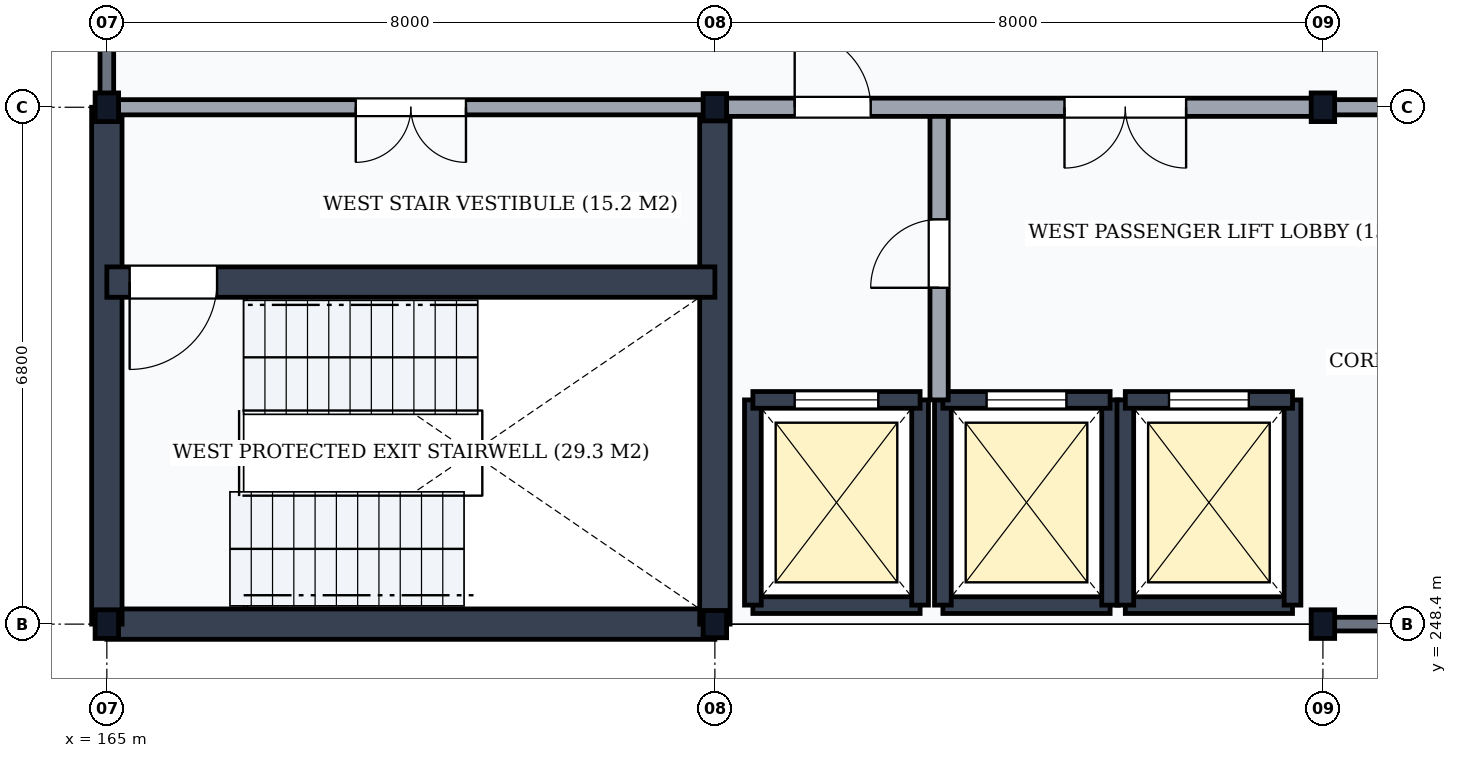
"""IFC4 building model, lengths in metres.
Left out: names, types, materials, properties, quantities, classifications, styles, units other than length and angle.
Written with IfcOpenShell. Run it as: python <this file> out.ifc"""

import sys

from ifc_helpers import new_model, si_unit, direction, frame, frame_2d, origin, origin_2d, place, context, subcontext, project, spatial, rectangle, i_section, extrude, element, fill, save


model = new_model("IFC4")
c1 = context("Model", 3, precision=1e-05, world=origin(), true_north=direction((0.0, 1.0)))
c2 = subcontext(c1, "Body", "Model", "MODEL_VIEW")
j1 = project(units=[si_unit("LENGTHUNIT", "METRE"), si_unit("PLANEANGLEUNIT", "RADIAN")], contexts=[c1])
p1 = place(None, origin())
s1 = spatial("IfcSite", under=j1, at=p1, CompositionType="ELEMENT")
p2 = place(p1, origin())
s2 = spatial("IfcBuilding", under=s1, at=p2, CompositionType="ELEMENT")
p3 = place(p2, frame((0.0, 0.0, 39.9)))
s3 = spatial("IfcBuildingStorey", under=s2, at=p3, CompositionType="ELEMENT", Elevation=39.9)
for number, where, z_axis, x_axis in (
    (1, (165.0, 248.4, 0.0), (0.0, 0.0, 1.0), (1.0, 0.0, 0.0)),
    (2, (165.0, 255.2, 0.0), (0.0, 0.0, 1.0), (1.0, 0.0, 0.0)),
):
    element("IfcColumn", number, at=place(p3, frame(where, z_axis=z_axis, x_axis=x_axis)), inside=s3, PredefinedType="COLUMN", context=c2, shape_type="SweptSolid", body=[
        extrude(i_section(OverallWidth=0.309, OverallDepth=0.377, WebThickness=0.021, FlangeThickness=0.04, FilletRadius=0.027, at=origin_2d()), origin(), (0.0, 0.0, 1.0), 3.9),
    ])
for number, where, z_axis, x_axis in (
    (3, (173.0, 248.4, 0.0), (0.0, 0.0, 1.0), (1.0, 0.0, 0.0)),
    (4, (173.0, 255.2, 0.0), (0.0, 0.0, 1.0), (1.0, 0.0, 0.0)),
):
    element("IfcColumn", number, at=place(p3, frame(where, z_axis=z_axis, x_axis=x_axis)), inside=s3, PredefinedType="COLUMN", context=c2, shape_type="SweptSolid", body=[
        extrude(i_section(OverallWidth=0.309, OverallDepth=0.359, WebThickness=0.021, FlangeThickness=0.04, FilletRadius=0.027, at=origin_2d()), origin(), (0.0, 0.0, 1.0), 3.9),
    ])
for number, where, z_axis, x_axis in (
    (5, (181.0, 248.4, 0.0), (0.0, 0.0, 1.0), (1.0, 0.0, 0.0)),
    (6, (181.0, 255.2, 0.0), (0.0, 0.0, 1.0), (1.0, 0.0, 0.0)),
):
    element("IfcColumn", number, at=place(p3, frame(where, z_axis=z_axis, x_axis=x_axis)), inside=s3, PredefinedType="COLUMN", context=c2, shape_type="SweptSolid", body=[
        extrude(i_section(OverallWidth=0.309, OverallDepth=0.377, WebThickness=0.021, FlangeThickness=0.04, FilletRadius=0.027, at=origin_2d()), origin(), (0.0, 0.0, 1.0), 3.9),
    ])
p4 = place(p3, frame((181.006, 248.4, 0.0), z_axis=(0.0, 0.0, 1.0), x_axis=(1.0, 0.0, 0.0)))
e7 = element("IfcWall", 7, at=p4, inside=s3, PredefinedType="SOLIDWALL", context=c2, shape_type="SweptSolid", body=[
    extrude(rectangle(XDim=7.988, YDim=0.18, at=frame_2d((3.994, 0.0))), origin(), (0.0, 0.0, 1.0), 3.368),
])
p5 = place(p4, frame((3.319, 0.0, 0.85)))
e8 = element("IfcOpeningElement", 8, at=p5, cuts=e7, PredefinedType="OPENING", context=c2, shape_type="SweptSolid", body=[
    extrude(rectangle(XDim=0.75, YDim=2.0, at=frame_2d((0.375, 1.0))), frame((0.0, 0.105, 0.0), z_axis=(0.0, -1.0, 0.0), x_axis=(1.0, 0.0, 0.0)), (0.0, 0.0, 1.0), 0.21),
])
p6 = place(p3, frame((165.0, 255.206, 0.0), z_axis=(0.0, 0.0, 1.0), x_axis=(0.0, 1.0, 0.0)))
e9 = element("IfcWall", 9, at=p6, inside=s3, PredefinedType="SOLIDWALL", context=c2, shape_type="SweptSolid", body=[
    extrude(rectangle(XDim=7.588, YDim=0.18, at=frame_2d((3.794, 0.0))), origin(), (0.0, 0.0, 1.0), 3.408),
])
p7 = place(p3, frame((165.0, 248.4, 0.0), z_axis=(0.0, 0.0, 1.0), x_axis=(1.0, 0.0, 0.0)))
e10 = element("IfcWall", 10, at=p7, inside=s3, PredefinedType="SHEAR", context=c2, shape_type="SweptSolid", body=[
    extrude(rectangle(XDim=8.0, YDim=0.4, at=frame_2d((4.0, 0.0))), origin(), (0.0, 0.0, 1.0), 3.68),
])
for number, where, z_axis, x_axis in (
    (11, (165.0, 248.4, 0.0), (0.0, 0.0, 1.0), (0.0, 1.0, 0.0)),
    (12, (173.0, 248.4, 0.0), (0.0, 0.0, 1.0), (0.0, 1.0, 0.0)),
):
    element("IfcWall", number, at=place(p3, frame(where, z_axis=z_axis, x_axis=x_axis)), inside=s3, PredefinedType="SHEAR", context=c2, shape_type="SweptSolid", body=[
        extrude(rectangle(XDim=6.8, YDim=0.4, at=frame_2d((3.4, 0.0))), origin(), (0.0, 0.0, 1.0), 3.68),
    ])
p8 = place(p3, frame((165.0, 252.9, 0.0), z_axis=(0.0, 0.0, 1.0), x_axis=(1.0, 0.0, 0.0)))
e13 = element("IfcWall", 13, at=p8, inside=s3, PredefinedType="SHEAR", context=c2, shape_type="SweptSolid", body=[
    extrude(rectangle(XDim=8.0, YDim=0.4, at=frame_2d((4.0, 0.0))), origin(), (0.0, 0.0, 1.0), 3.68),
])
p9 = place(p8, frame((0.3, 0.0, 0.0)))
e14 = element("IfcOpeningElement", 14, at=p9, cuts=e13, PredefinedType="OPENING", context=c2, shape_type="SweptSolid", body=[
    extrude(rectangle(XDim=1.15, YDim=2.15, at=frame_2d((0.575, 1.075))), frame((0.0, 0.215, 0.0), z_axis=(0.0, -1.0, 0.0), x_axis=(1.0, 0.0, 0.0)), (0.0, 0.0, 1.0), 0.43),
])
p10 = place(p3, frame((165.0, 255.2, 0.0), z_axis=(0.0, 0.0, 1.0), x_axis=(1.0, 0.0, 0.0)))
e15 = element("IfcWall", 15, at=p10, inside=s3, PredefinedType="PARTITIONING", context=c2, shape_type="SweptSolid", body=[
    extrude(rectangle(XDim=8.0, YDim=0.2, at=frame_2d((4.0, 0.0))), origin(), (0.0, 0.0, 1.0), 3.178),
])
p11 = place(p10, frame((3.275, 0.0, 0.0)))
e16 = element("IfcOpeningElement", 16, at=p11, cuts=e15, PredefinedType="OPENING", context=c2, shape_type="SweptSolid", body=[
    extrude(rectangle(XDim=1.45, YDim=2.2, at=frame_2d((0.725, 1.1))), frame((0.0, 0.115, 0.0), z_axis=(0.0, -1.0, 0.0), x_axis=(1.0, 0.0, 0.0)), (0.0, 0.0, 1.0), 0.23),
])
p12 = place(p3, frame((173.5, 248.65, 0.0), z_axis=(0.0, 0.0, 1.0), x_axis=(1.0, 0.0, 0.0)))
e17 = element("IfcWall", 17, at=p12, inside=s3, PredefinedType="SHEAR", context=c2, shape_type="SweptSolid", body=[
    extrude(rectangle(XDim=2.2, YDim=0.22, at=frame_2d((1.1, 0.0))), origin(), (0.0, 0.0, 1.0), 3.68),
])
for number, where, z_axis, x_axis in (
    (18, (173.5, 248.65, 0.0), (0.0, 0.0, 1.0), (0.0, 1.0, 0.0)),
    (19, (175.7, 248.65, 0.0), (0.0, 0.0, 1.0), (0.0, 1.0, 0.0)),
):
    element("IfcWall", number, at=place(p3, frame(where, z_axis=z_axis, x_axis=x_axis)), inside=s3, PredefinedType="SHEAR", context=c2, shape_type="SweptSolid", body=[
        extrude(rectangle(XDim=2.7, YDim=0.22, at=frame_2d((1.35, 0.0))), origin(), (0.0, 0.0, 1.0), 3.68),
    ])
p13 = place(p3, frame((173.5, 251.35, 0.0), z_axis=(0.0, 0.0, 1.0), x_axis=(1.0, 0.0, 0.0)))
e20 = element("IfcWall", 20, at=p13, inside=s3, PredefinedType="SHEAR", context=c2, shape_type="SweptSolid", body=[
    extrude(rectangle(XDim=2.2, YDim=0.22, at=frame_2d((1.1, 0.0))), origin(), (0.0, 0.0, 1.0), 3.68),
])
p14 = place(p13, frame((0.55, 0.0, 0.0)))
e21 = element("IfcOpeningElement", 21, at=p14, cuts=e20, PredefinedType="OPENING", context=c2, shape_type="SweptSolid", body=[
    extrude(rectangle(XDim=1.1, YDim=2.15, at=frame_2d((0.55, 1.075))), frame((0.0, 0.125, 0.0), z_axis=(0.0, -1.0, 0.0), x_axis=(1.0, 0.0, 0.0)), (0.0, 0.0, 1.0), 0.25),
])
p15 = place(p3, frame((176.0, 248.65, 0.0), z_axis=(0.0, 0.0, 1.0), x_axis=(1.0, 0.0, 0.0)))
e22 = element("IfcWall", 22, at=p15, inside=s3, PredefinedType="SHEAR", context=c2, shape_type="SweptSolid", body=[
    extrude(rectangle(XDim=2.2, YDim=0.22, at=frame_2d((1.1, 0.0))), origin(), (0.0, 0.0, 1.0), 3.68),
])
for number, where, z_axis, x_axis in (
    (23, (176.0, 248.65, 0.0), (0.0, 0.0, 1.0), (0.0, 1.0, 0.0)),
    (24, (178.2, 248.65, 0.0), (0.0, 0.0, 1.0), (0.0, 1.0, 0.0)),
):
    element("IfcWall", number, at=place(p3, frame(where, z_axis=z_axis, x_axis=x_axis)), inside=s3, PredefinedType="SHEAR", context=c2, shape_type="SweptSolid", body=[
        extrude(rectangle(XDim=2.7, YDim=0.22, at=frame_2d((1.35, 0.0))), origin(), (0.0, 0.0, 1.0), 3.68),
    ])
p16 = place(p3, frame((176.0, 251.35, 0.0), z_axis=(0.0, 0.0, 1.0), x_axis=(1.0, 0.0, 0.0)))
e25 = element("IfcWall", 25, at=p16, inside=s3, PredefinedType="SHEAR", context=c2, shape_type="SweptSolid", body=[
    extrude(rectangle(XDim=2.2, YDim=0.22, at=frame_2d((1.1, 0.0))), origin(), (0.0, 0.0, 1.0), 3.68),
])
p17 = place(p16, frame((0.575, 0.0, 0.0)))
e26 = element("IfcOpeningElement", 26, at=p17, cuts=e25, PredefinedType="OPENING", context=c2, shape_type="SweptSolid", body=[
    extrude(rectangle(XDim=1.05, YDim=2.15, at=frame_2d((0.525, 1.075))), frame((0.0, 0.125, 0.0), z_axis=(0.0, -1.0, 0.0), x_axis=(1.0, 0.0, 0.0)), (0.0, 0.0, 1.0), 0.25),
])
p18 = place(p3, frame((178.4, 248.65, 0.0), z_axis=(0.0, 0.0, 1.0), x_axis=(1.0, 0.0, 0.0)))
e27 = element("IfcWall", 27, at=p18, inside=s3, PredefinedType="SHEAR", context=c2, shape_type="SweptSolid", body=[
    extrude(rectangle(XDim=2.2, YDim=0.22, at=frame_2d((1.1, 0.0))), origin(), (0.0, 0.0, 1.0), 3.68),
])
for number, where, z_axis, x_axis in (
    (28, (178.4, 248.65, 0.0), (0.0, 0.0, 1.0), (0.0, 1.0, 0.0)),
    (29, (180.6, 248.65, 0.0), (0.0, 0.0, 1.0), (0.0, 1.0, 0.0)),
):
    element("IfcWall", number, at=place(p3, frame(where, z_axis=z_axis, x_axis=x_axis)), inside=s3, PredefinedType="SHEAR", context=c2, shape_type="SweptSolid", body=[
        extrude(rectangle(XDim=2.7, YDim=0.22, at=frame_2d((1.35, 0.0))), origin(), (0.0, 0.0, 1.0), 3.68),
    ])
p19 = place(p3, frame((178.4, 251.35, 0.0), z_axis=(0.0, 0.0, 1.0), x_axis=(1.0, 0.0, 0.0)))
e30 = element("IfcWall", 30, at=p19, inside=s3, PredefinedType="SHEAR", context=c2, shape_type="SweptSolid", body=[
    extrude(rectangle(XDim=2.2, YDim=0.22, at=frame_2d((1.1, 0.0))), origin(), (0.0, 0.0, 1.0), 3.68),
])
p20 = place(p19, frame((0.575, 0.0, 0.0)))
e31 = element("IfcOpeningElement", 31, at=p20, cuts=e30, PredefinedType="OPENING", context=c2, shape_type="SweptSolid", body=[
    extrude(rectangle(XDim=1.05, YDim=2.15, at=frame_2d((0.525, 1.075))), frame((0.0, 0.125, 0.0), z_axis=(0.0, -1.0, 0.0), x_axis=(1.0, 0.0, 0.0)), (0.0, 0.0, 1.0), 0.25),
])
p21 = place(p3, frame((175.95, 251.35, 0.0), z_axis=(0.0, 0.0, 1.0), x_axis=(0.0, 1.0, 0.0)))
e32 = element("IfcWall", 32, at=p21, inside=s3, PredefinedType="PARTITIONING", context=c2, shape_type="SweptSolid", body=[
    extrude(rectangle(XDim=3.85, YDim=0.24, at=frame_2d((1.925, 0.0))), origin(), (0.0, 0.0, 1.0), 3.68),
])
p22 = place(p21, frame((1.475, 0.0, 0.0)))
e33 = element("IfcOpeningElement", 33, at=p22, cuts=e32, PredefinedType="OPENING", context=c2, shape_type="SweptSolid", body=[
    extrude(rectangle(XDim=0.9, YDim=2.1, at=frame_2d((0.45, 1.05))), frame((0.0, 0.135, 0.0), z_axis=(0.0, -1.0, 0.0), x_axis=(1.0, 0.0, 0.0)), (0.0, 0.0, 1.0), 0.27),
])
p23 = place(p3, frame((173.0, 255.2, 0.0), z_axis=(0.0, 0.0, 1.0), x_axis=(1.0, 0.0, 0.0)))
e34 = element("IfcWall", 34, at=p23, inside=s3, PredefinedType="PARTITIONING", context=c2, shape_type="SweptSolid", body=[
    extrude(rectangle(XDim=8.0, YDim=0.24, at=frame_2d((4.0, 0.0))), origin(), (0.0, 0.0, 1.0), 3.178),
])
p24 = place(p23, frame((1.05, 0.0, 0.0)))
e35 = element("IfcOpeningElement", 35, at=p24, cuts=e34, PredefinedType="OPENING", context=c2, shape_type="SweptSolid", body=[
    extrude(rectangle(XDim=1.0, YDim=2.1, at=frame_2d((0.5, 1.05))), frame((0.0, 0.135, 0.0), z_axis=(0.0, -1.0, 0.0), x_axis=(1.0, 0.0, 0.0)), (0.0, 0.0, 1.0), 0.27),
])
p25 = place(p23, frame((4.6, 0.0, 0.0)))
e36 = element("IfcOpeningElement", 36, at=p25, cuts=e34, PredefinedType="OPENING", context=c2, shape_type="SweptSolid", body=[
    extrude(rectangle(XDim=1.6, YDim=2.25, at=frame_2d((0.8, 1.125))), frame((0.0, 0.135, 0.0), z_axis=(0.0, -1.0, 0.0), x_axis=(1.0, 0.0, 0.0)), (0.0, 0.0, 1.0), 0.27),
])
p26 = place(p3, frame((181.0, 255.2, 0.0), z_axis=(0.0, 0.0, 1.0), x_axis=(1.0, 0.0, 0.0)))
e37 = element("IfcWall", 37, at=p26, inside=s3, PredefinedType="PARTITIONING", context=c2, shape_type="SweptSolid", body=[
    extrude(rectangle(XDim=8.0, YDim=0.2, at=frame_2d((4.0, 0.0))), origin(), (0.0, 0.0, 1.0), 3.178),
])
p27 = place(p26, frame((0.85, 0.0, 0.0)))
e38 = element("IfcOpeningElement", 38, at=p27, cuts=e37, PredefinedType="OPENING", context=c2, shape_type="SweptSolid", body=[
    extrude(rectangle(XDim=0.9, YDim=2.1, at=frame_2d((0.45, 1.05))), frame((0.0, 0.115, 0.0), z_axis=(0.0, -1.0, 0.0), x_axis=(1.0, 0.0, 0.0)), (0.0, 0.0, 1.0), 0.23),
])
p28 = place(p26, frame((3.25, 0.0, 0.0)))
e39 = element("IfcOpeningElement", 39, at=p28, cuts=e37, PredefinedType="OPENING", context=c2, shape_type="SweptSolid", body=[
    extrude(rectangle(XDim=0.9, YDim=2.1, at=frame_2d((0.45, 1.05))), frame((0.0, 0.115, 0.0), z_axis=(0.0, -1.0, 0.0), x_axis=(1.0, 0.0, 0.0)), (0.0, 0.0, 1.0), 0.23),
])
p29 = place(p26, frame((5.075, 0.0, 0.0)))
e40 = element("IfcOpeningElement", 40, at=p29, cuts=e37, PredefinedType="OPENING", context=c2, shape_type="SweptSolid", body=[
    extrude(rectangle(XDim=0.95, YDim=2.1, at=frame_2d((0.475, 1.05))), frame((0.0, 0.115, 0.0), z_axis=(0.0, -1.0, 0.0), x_axis=(1.0, 0.0, 0.0)), (0.0, 0.0, 1.0), 0.23),
])
p30 = place(p26, frame((6.5, 0.0, 0.0)))
e41 = element("IfcOpeningElement", 41, at=p30, cuts=e37, PredefinedType="OPENING", context=c2, shape_type="SweptSolid", body=[
    extrude(rectangle(XDim=0.85, YDim=2.1, at=frame_2d((0.425, 1.05))), frame((0.0, 0.115, 0.0), z_axis=(0.0, -1.0, 0.0), x_axis=(1.0, 0.0, 0.0)), (0.0, 0.0, 1.0), 0.23),
])
p31 = place(p9, frame((1.15, 0.0, 0.0), z_axis=(0.0, 0.0, 1.0), x_axis=(-1.0, 0.0, 0.0)))
e42 = element("IfcDoor", 42, at=p31, inside=s3, OperationType="SINGLE_SWING_RIGHT", PredefinedType="DOOR", context=c2, shape_type="SweptSolid", body=[
    extrude(rectangle(XDim=1.15, YDim=2.15, at=frame_2d((0.575, 1.075))), frame((0.0, 0.025, 0.0), z_axis=(0.0, -1.0, 0.0), x_axis=(1.0, 0.0, 0.0)), (0.0, 0.0, 1.0), 0.05),
])
fill(e14, e42)
p32 = place(p11, frame((1.45, 0.0, 0.0), z_axis=(0.0, 0.0, 1.0), x_axis=(-1.0, 0.0, 0.0)))
e43 = element("IfcDoor", 43, at=p32, inside=s3, OperationType="DOUBLE_DOOR_SINGLE_SWING", PredefinedType="DOOR", context=c2, shape_type="SweptSolid", body=[
    extrude(rectangle(XDim=1.45, YDim=2.2, at=frame_2d((0.725, 1.1))), frame((0.0, 0.025, 0.0), z_axis=(0.0, -1.0, 0.0), x_axis=(1.0, 0.0, 0.0)), (0.0, 0.0, 1.0), 0.05),
])
fill(e16, e43)
p33 = place(p14, origin())
e44 = element("IfcDoor", 44, at=p33, inside=s3, OperationType="DOUBLE_DOOR_SLIDING", PredefinedType="USERDEFINED", context=c2, shape_type="SweptSolid", body=[
    extrude(rectangle(XDim=1.1, YDim=2.15, at=frame_2d((0.55, 1.075))), frame((0.0, 0.025, 0.0), z_axis=(0.0, -1.0, 0.0), x_axis=(1.0, 0.0, 0.0)), (0.0, 0.0, 1.0), 0.05),
])
fill(e21, e44)
p34 = place(p17, origin())
e45 = element("IfcDoor", 45, at=p34, inside=s3, OperationType="DOUBLE_DOOR_SLIDING", PredefinedType="USERDEFINED", context=c2, shape_type="SweptSolid", body=[
    extrude(rectangle(XDim=1.05, YDim=2.15, at=frame_2d((0.525, 1.075))), frame((0.0, 0.025, 0.0), z_axis=(0.0, -1.0, 0.0), x_axis=(1.0, 0.0, 0.0)), (0.0, 0.0, 1.0), 0.05),
])
fill(e26, e45)
p35 = place(p20, origin())
e46 = element("IfcDoor", 46, at=p35, inside=s3, OperationType="DOUBLE_DOOR_SLIDING", PredefinedType="USERDEFINED", context=c2, shape_type="SweptSolid", body=[
    extrude(rectangle(XDim=1.05, YDim=2.15, at=frame_2d((0.525, 1.075))), frame((0.0, 0.025, 0.0), z_axis=(0.0, -1.0, 0.0), x_axis=(1.0, 0.0, 0.0)), (0.0, 0.0, 1.0), 0.05),
])
fill(e31, e46)
p36 = place(p22, origin())
e47 = element("IfcDoor", 47, at=p36, inside=s3, OperationType="SINGLE_SWING_LEFT", PredefinedType="DOOR", context=c2, shape_type="SweptSolid", body=[
    extrude(rectangle(XDim=0.9, YDim=2.1, at=frame_2d((0.45, 1.05))), frame((0.0, 0.025, 0.0), z_axis=(0.0, -1.0, 0.0), x_axis=(1.0, 0.0, 0.0)), (0.0, 0.0, 1.0), 0.05),
])
fill(e33, e47)
p37 = place(p24, origin())
e48 = element("IfcDoor", 48, at=p37, inside=s3, OperationType="SINGLE_SWING_LEFT", PredefinedType="DOOR", context=c2, shape_type="SweptSolid", body=[
    extrude(rectangle(XDim=1.0, YDim=2.1, at=frame_2d((0.5, 1.05))), frame((0.0, 0.025, 0.0), z_axis=(0.0, -1.0, 0.0), x_axis=(1.0, 0.0, 0.0)), (0.0, 0.0, 1.0), 0.05),
])
fill(e35, e48)
p38 = place(p25, frame((1.6, 0.0, 0.0), z_axis=(0.0, 0.0, 1.0), x_axis=(-1.0, 0.0, 0.0)))
e49 = element("IfcDoor", 49, at=p38, inside=s3, OperationType="DOUBLE_DOOR_SINGLE_SWING", PredefinedType="DOOR", context=c2, shape_type="SweptSolid", body=[
    extrude(rectangle(XDim=1.6, YDim=2.25, at=frame_2d((0.8, 1.125))), frame((0.0, 0.025, 0.0), z_axis=(0.0, -1.0, 0.0), x_axis=(1.0, 0.0, 0.0)), (0.0, 0.0, 1.0), 0.05),
])
fill(e36, e49)
save(model, sys.argv[1])
